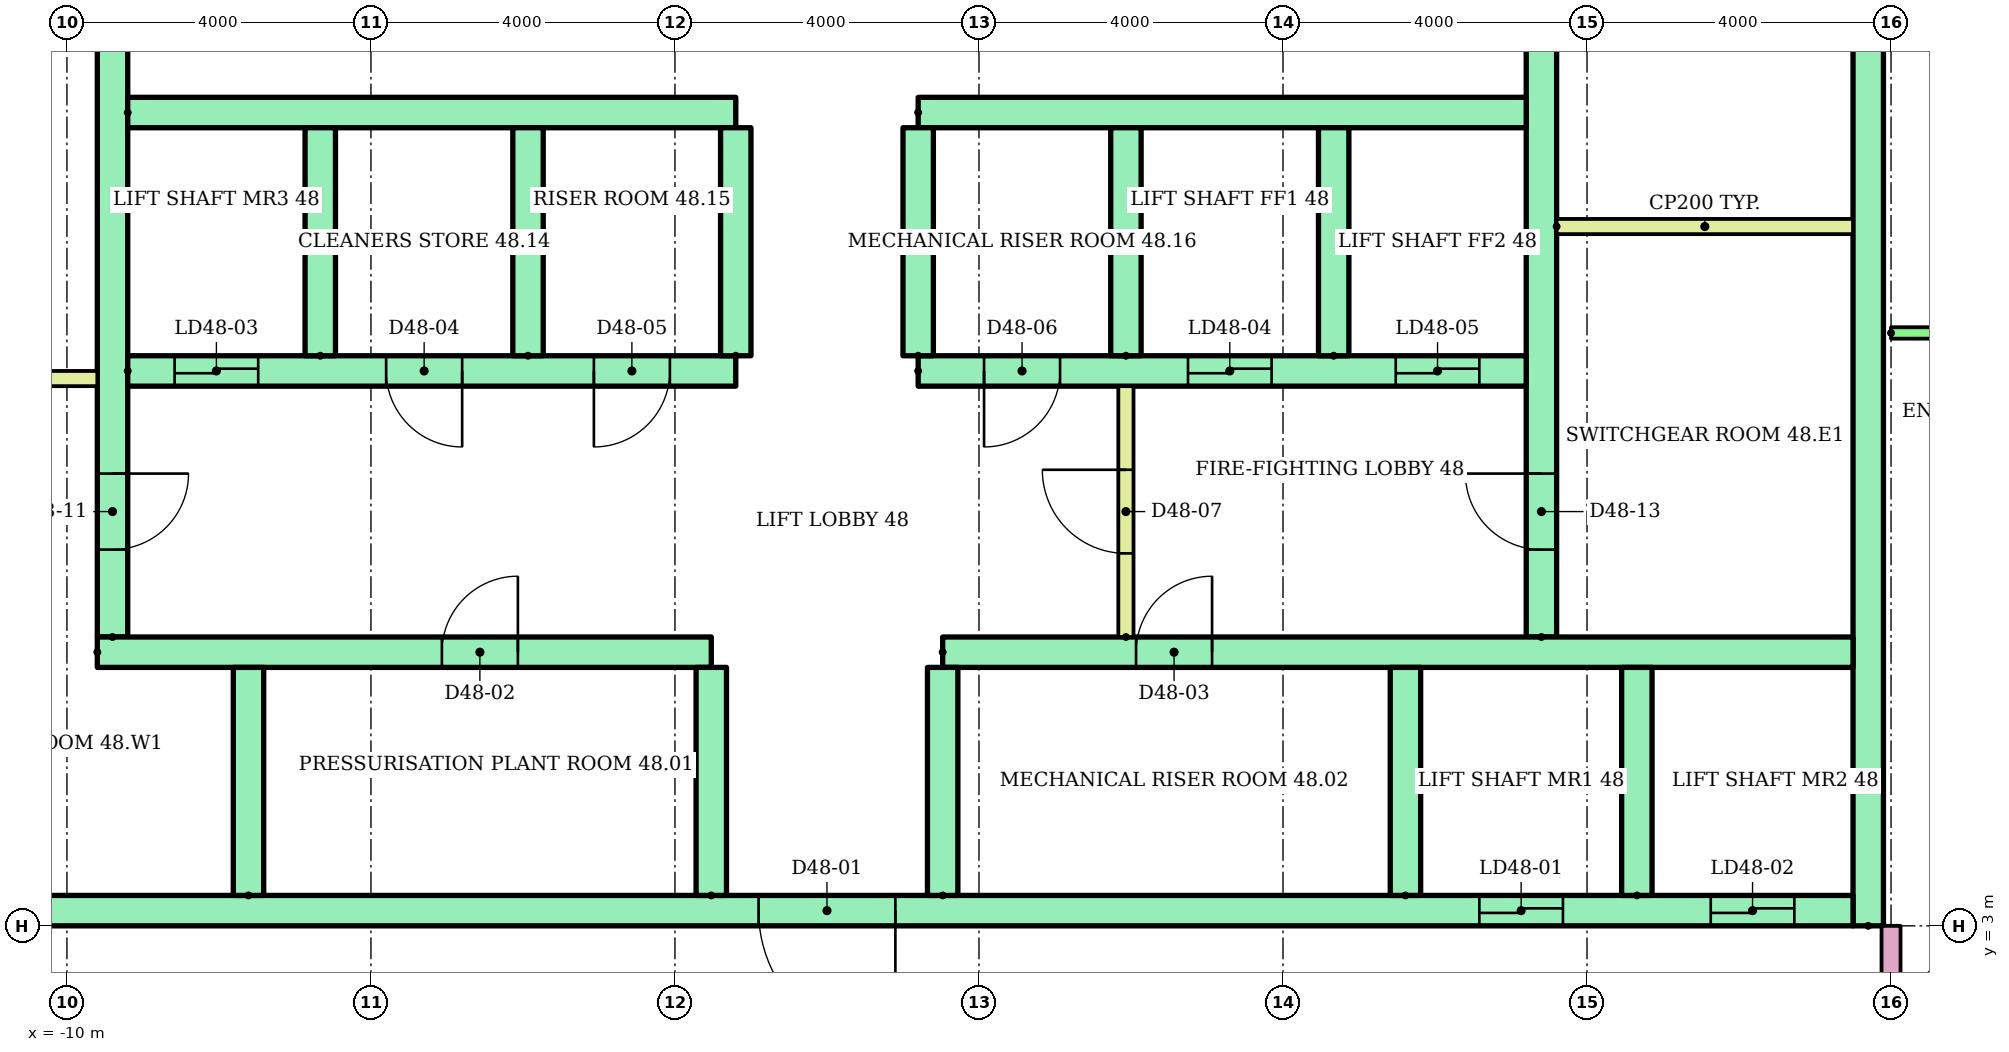
"""IFC4 building model, lengths in metres.
Left out: names, types, materials, properties, quantities, classifications, styles, units other than length and angle.
Written with IfcOpenShell. Run it as: python <this file> out.ifc"""

import sys

from ifc_helpers import new_model, si_unit, direction, frame, frame_2d, origin, place, context, subcontext, project, spatial, rectangle, extrude, element, fill, save


model = new_model("IFC4")
c1 = context("Model", 3, precision=1e-05, world=origin(), true_north=direction((0.0, 1.0)))
c2 = subcontext(c1, "Body", "Model", "MODEL_VIEW")
j1 = project(units=[si_unit("LENGTHUNIT", "METRE"), si_unit("PLANEANGLEUNIT", "RADIAN")], contexts=[c1])
p1 = place(None, origin())
s1 = spatial("IfcSite", under=j1, at=p1, CompositionType="ELEMENT")
p2 = place(p1, origin())
s2 = spatial("IfcBuilding", under=s1, at=p2, CompositionType="ELEMENT")
p3 = place(p2, frame((0.0, 0.0, 184.5)))
s3 = spatial("IfcBuildingStorey", under=s2, at=p3, CompositionType="ELEMENT", Elevation=184.5)
p4 = place(p3, frame((13.7, 3.0, 0.0), z_axis=(0.0, 0.0, 1.0), x_axis=(0.0, 1.0, 0.0)))
e1 = element("IfcWall", 1, at=p4, inside=s3, PredefinedType="SHEAR", context=c2, shape_type="SweptSolid", body=[
    extrude(rectangle(XDim=17.0, YDim=0.4, at=frame_2d((8.5, 0.0))), origin(), (0.0, 0.0, 1.0), 2.92),
])
p5 = place(p3, frame((-9.4, 6.8, 0.0), z_axis=(0.0, 0.0, 1.0), x_axis=(0.0, 1.0, 0.0)))
e2 = element("IfcWall", 2, at=p5, inside=s3, PredefinedType="SHEAR", context=c2, shape_type="SweptSolid", body=[
    extrude(rectangle(XDim=12.7, YDim=0.4, at=frame_2d((6.35, 0.0))), origin(), (0.0, 0.0, 1.0), 2.92),
])
p6 = place(p5, frame((1.15, 0.0, 0.0)))
e3 = element("IfcOpeningElement", 3, at=p6, cuts=e2, PredefinedType="OPENING", context=c2, shape_type="SweptSolid", body=[
    extrude(rectangle(XDim=1.0, YDim=2.1, at=frame_2d((0.5, 1.05))), frame((0.0, 0.21, 0.0), z_axis=(0.0, -1.0, 0.0), x_axis=(1.0, 0.0, 0.0)), (0.0, 0.0, 1.0), 0.42),
])
p7 = place(p5, frame((7.925, 0.0, 0.0)))
e4 = element("IfcOpeningElement", 4, at=p7, cuts=e2, PredefinedType="OPENING", context=c2, shape_type="SweptSolid", body=[
    extrude(rectangle(XDim=1.0, YDim=2.1, at=frame_2d((0.5, 1.05))), frame((0.0, 0.21, 0.0), z_axis=(0.0, -1.0, 0.0), x_axis=(1.0, 0.0, 0.0)), (0.0, 0.0, 1.0), 0.42),
])
p8 = place(p3, frame((9.4, 6.8, 0.0), z_axis=(0.0, 0.0, 1.0), x_axis=(0.0, 1.0, 0.0)))
e5 = element("IfcWall", 5, at=p8, inside=s3, PredefinedType="SHEAR", context=c2, shape_type="SweptSolid", body=[
    extrude(rectangle(XDim=12.7, YDim=0.4, at=frame_2d((6.35, 0.0))), origin(), (0.0, 0.0, 1.0), 2.92),
])
p9 = place(p8, frame((1.15, 0.0, 0.0)))
e6 = element("IfcOpeningElement", 6, at=p9, cuts=e5, PredefinedType="OPENING", context=c2, shape_type="SweptSolid", body=[
    extrude(rectangle(XDim=1.0, YDim=2.1, at=frame_2d((0.5, 1.05))), frame((0.0, 0.21, 0.0), z_axis=(0.0, -1.0, 0.0), x_axis=(1.0, 0.0, 0.0)), (0.0, 0.0, 1.0), 0.42),
])
p10 = place(p8, frame((7.925, 0.0, 0.0)))
e7 = element("IfcOpeningElement", 7, at=p10, cuts=e5, PredefinedType="OPENING", context=c2, shape_type="SweptSolid", body=[
    extrude(rectangle(XDim=1.0, YDim=2.1, at=frame_2d((0.5, 1.05))), frame((0.0, 0.21, 0.0), z_axis=(0.0, -1.0, 0.0), x_axis=(1.0, 0.0, 0.0)), (0.0, 0.0, 1.0), 0.42),
])
p11 = place(p3, frame((-13.5, 3.2, 0.0)))
e8 = element("IfcWall", 8, at=p11, inside=s3, PredefinedType="SHEAR", context=c2, shape_type="SweptSolid", body=[
    extrude(rectangle(XDim=27.0, YDim=0.4, at=frame_2d((13.5, 0.0))), origin(), (0.0, 0.0, 1.0), 2.92),
])
p12 = place(p11, frame((22.083, 0.0, 0.0)))
e9 = element("IfcOpeningElement", 9, at=p12, cuts=e8, PredefinedType="OPENING", context=c2, shape_type="SweptSolid", body=[
    extrude(rectangle(XDim=1.1, YDim=2.1, at=frame_2d((0.55, 1.05))), frame((0.0, 0.21, 0.0), z_axis=(0.0, -1.0, 0.0), x_axis=(1.0, 0.0, 0.0)), (0.0, 0.0, 1.0), 0.42),
])
p13 = place(p11, frame((25.128, 0.0, 0.0)))
e10 = element("IfcOpeningElement", 10, at=p13, cuts=e8, PredefinedType="OPENING", context=c2, shape_type="SweptSolid", body=[
    extrude(rectangle(XDim=1.1, YDim=2.1, at=frame_2d((0.55, 1.05))), frame((0.0, 0.21, 0.0), z_axis=(0.0, -1.0, 0.0), x_axis=(1.0, 0.0, 0.0)), (0.0, 0.0, 1.0), 0.42),
])
p14 = place(p11, frame((12.6, 0.0, 0.0)))
e11 = element("IfcOpeningElement", 11, at=p14, cuts=e8, PredefinedType="OPENING", context=c2, shape_type="SweptSolid", body=[
    extrude(rectangle(XDim=1.8, YDim=2.1, at=frame_2d((0.9, 1.05))), frame((0.0, 0.21, 0.0), z_axis=(0.0, -1.0, 0.0), x_axis=(1.0, 0.0, 0.0)), (0.0, 0.0, 1.0), 0.42),
])
p15 = place(p3, frame((-9.6, 6.6, 0.0)))
e12 = element("IfcWall", 12, at=p15, inside=s3, PredefinedType="SHEAR", context=c2, shape_type="SweptSolid", body=[
    extrude(rectangle(XDim=8.078, YDim=0.4, at=frame_2d((4.039, 0.0))), origin(), (0.0, 0.0, 1.0), 2.92),
])
p16 = place(p15, frame((4.533, 0.0, 0.0)))
e13 = element("IfcOpeningElement", 13, at=p16, cuts=e12, PredefinedType="OPENING", context=c2, shape_type="SweptSolid", body=[
    extrude(rectangle(XDim=1.0, YDim=2.1, at=frame_2d((0.5, 1.05))), frame((0.0, 0.21, 0.0), z_axis=(0.0, -1.0, 0.0), x_axis=(1.0, 0.0, 0.0)), (0.0, 0.0, 1.0), 0.42),
])
p17 = place(p3, frame((1.522, 6.6, 0.0)))
e14 = element("IfcWall", 14, at=p17, inside=s3, PredefinedType="SHEAR", context=c2, shape_type="SweptSolid", body=[
    extrude(rectangle(XDim=11.978, YDim=0.4, at=frame_2d((5.989, 0.0))), origin(), (0.0, 0.0, 1.0), 2.92),
])
p18 = place(p17, frame((2.544, 0.0, 0.0)))
e15 = element("IfcOpeningElement", 15, at=p18, cuts=e14, PredefinedType="OPENING", context=c2, shape_type="SweptSolid", body=[
    extrude(rectangle(XDim=1.0, YDim=2.1, at=frame_2d((0.5, 1.05))), frame((0.0, 0.21, 0.0), z_axis=(0.0, -1.0, 0.0), x_axis=(1.0, 0.0, 0.0)), (0.0, 0.0, 1.0), 0.42),
])
for number, where, z_axis, x_axis in (
    (16, (-7.611, 3.4, 0.0), (0.0, 0.0, 1.0), (0.0, 1.0, 0.0)),
    (17, (-1.522, 3.4, 0.0), (0.0, 0.0, 1.0), (0.0, 1.0, 0.0)),
    (18, (1.522, 3.4, 0.0), (0.0, 0.0, 1.0), (0.0, 1.0, 0.0)),
    (19, (7.611, 3.4, 0.0), (0.0, 0.0, 1.0), (0.0, 1.0, 0.0)),
    (20, (10.656, 3.4, 0.0), (0.0, 0.0, 1.0), (0.0, 1.0, 0.0)),
):
    element("IfcWall", number, at=place(p3, frame(where, z_axis=z_axis, x_axis=x_axis)), inside=s3, PredefinedType="SHEAR", context=c2, shape_type="SweptSolid", body=[
        extrude(rectangle(XDim=3.0, YDim=0.4, at=frame_2d((1.5, 0.0))), origin(), (0.0, 0.0, 1.0), 2.92),
    ])
p19 = place(p3, frame((-9.2, 10.3, 0.0)))
e21 = element("IfcWall", 21, at=p19, inside=s3, PredefinedType="SHEAR", context=c2, shape_type="SweptSolid", body=[
    extrude(rectangle(XDim=8.0, YDim=0.4, at=frame_2d((4.0, 0.0))), origin(), (0.0, 0.0, 1.0), 2.92),
])
p20 = place(p19, frame((0.617, 0.0, 0.0)))
e22 = element("IfcOpeningElement", 22, at=p20, cuts=e21, PredefinedType="OPENING", context=c2, shape_type="SweptSolid", body=[
    extrude(rectangle(XDim=1.1, YDim=2.1, at=frame_2d((0.55, 1.05))), frame((0.0, 0.21, 0.0), z_axis=(0.0, -1.0, 0.0), x_axis=(1.0, 0.0, 0.0)), (0.0, 0.0, 1.0), 0.42),
])
p21 = place(p19, frame((3.4, 0.0, 0.0)))
e23 = element("IfcOpeningElement", 23, at=p21, cuts=e21, PredefinedType="OPENING", context=c2, shape_type="SweptSolid", body=[
    extrude(rectangle(XDim=1.0, YDim=2.1, at=frame_2d((0.5, 1.05))), frame((0.0, 0.21, 0.0), z_axis=(0.0, -1.0, 0.0), x_axis=(1.0, 0.0, 0.0)), (0.0, 0.0, 1.0), 0.42),
])
p22 = place(p19, frame((6.133, 0.0, 0.0)))
e24 = element("IfcOpeningElement", 24, at=p22, cuts=e21, PredefinedType="OPENING", context=c2, shape_type="SweptSolid", body=[
    extrude(rectangle(XDim=1.0, YDim=2.1, at=frame_2d((0.5, 1.05))), frame((0.0, 0.21, 0.0), z_axis=(0.0, -1.0, 0.0), x_axis=(1.0, 0.0, 0.0)), (0.0, 0.0, 1.0), 0.42),
])
p23 = place(p3, frame((-9.2, 13.7, 0.0)))
e25 = element("IfcWall", 25, at=p23, inside=s3, PredefinedType="SHEAR", context=c2, shape_type="SweptSolid", body=[
    extrude(rectangle(XDim=8.0, YDim=0.4, at=frame_2d((4.0, 0.0))), origin(), (0.0, 0.0, 1.0), 2.92),
])
p24 = place(p3, frame((1.2, 10.3, 0.0)))
e26 = element("IfcWall", 26, at=p24, inside=s3, PredefinedType="SHEAR", context=c2, shape_type="SweptSolid", body=[
    extrude(rectangle(XDim=8.0, YDim=0.4, at=frame_2d((4.0, 0.0))), origin(), (0.0, 0.0, 1.0), 2.92),
])
p25 = place(p24, frame((3.55, 0.0, 0.0)))
e27 = element("IfcOpeningElement", 27, at=p25, cuts=e26, PredefinedType="OPENING", context=c2, shape_type="SweptSolid", body=[
    extrude(rectangle(XDim=1.1, YDim=2.1, at=frame_2d((0.55, 1.05))), frame((0.0, 0.21, 0.0), z_axis=(0.0, -1.0, 0.0), x_axis=(1.0, 0.0, 0.0)), (0.0, 0.0, 1.0), 0.42),
])
p26 = place(p24, frame((6.283, 0.0, 0.0)))
e28 = element("IfcOpeningElement", 28, at=p26, cuts=e26, PredefinedType="OPENING", context=c2, shape_type="SweptSolid", body=[
    extrude(rectangle(XDim=1.1, YDim=2.1, at=frame_2d((0.55, 1.05))), frame((0.0, 0.21, 0.0), z_axis=(0.0, -1.0, 0.0), x_axis=(1.0, 0.0, 0.0)), (0.0, 0.0, 1.0), 0.42),
])
p27 = place(p24, frame((0.867, 0.0, 0.0)))
e29 = element("IfcOpeningElement", 29, at=p27, cuts=e26, PredefinedType="OPENING", context=c2, shape_type="SweptSolid", body=[
    extrude(rectangle(XDim=1.0, YDim=2.1, at=frame_2d((0.5, 1.05))), frame((0.0, 0.21, 0.0), z_axis=(0.0, -1.0, 0.0), x_axis=(1.0, 0.0, 0.0)), (0.0, 0.0, 1.0), 0.42),
])
p28 = place(p3, frame((1.2, 13.7, 0.0)))
e30 = element("IfcWall", 30, at=p28, inside=s3, PredefinedType="SHEAR", context=c2, shape_type="SweptSolid", body=[
    extrude(rectangle(XDim=8.0, YDim=0.4, at=frame_2d((4.0, 0.0))), origin(), (0.0, 0.0, 1.0), 2.92),
])
for number, where, z_axis, x_axis in (
    (31, (-6.667, 10.5, 0.0), (0.0, 0.0, 1.0), (0.0, 1.0, 0.0)),
    (32, (-3.933, 10.5, 0.0), (0.0, 0.0, 1.0), (0.0, 1.0, 0.0)),
    (33, (-1.2, 10.5, 0.0), (0.0, 0.0, 1.0), (0.0, 1.0, 0.0)),
    (34, (1.2, 10.5, 0.0), (0.0, 0.0, 1.0), (0.0, 1.0, 0.0)),
    (35, (3.933, 10.5, 0.0), (0.0, 0.0, 1.0), (0.0, 1.0, 0.0)),
    (36, (6.667, 10.5, 0.0), (0.0, 0.0, 1.0), (0.0, 1.0, 0.0)),
):
    element("IfcWall", number, at=place(p3, frame(where, z_axis=z_axis, x_axis=x_axis)), inside=s3, PredefinedType="SHEAR", context=c2, shape_type="SweptSolid", body=[
        extrude(rectangle(XDim=3.0, YDim=0.4, at=frame_2d((1.5, 0.0))), origin(), (0.0, 0.0, 1.0), 2.92),
    ])
p29 = place(p3, frame((3.933, 6.8, 0.0), z_axis=(0.0, 0.0, 1.0), x_axis=(0.0, 1.0, 0.0)))
e37 = element("IfcWall", 37, at=p29, inside=s3, PredefinedType="PARTITIONING", context=c2, shape_type="SweptSolid", body=[
    extrude(rectangle(XDim=3.3, YDim=0.2, at=frame_2d((1.65, 0.0))), origin(), (0.0, 0.0, 1.0), 2.92),
])
p30 = place(p29, frame((1.1, 0.0, 0.0)))
e38 = element("IfcOpeningElement", 38, at=p30, cuts=e37, PredefinedType="OPENING", context=c2, shape_type="SweptSolid", body=[
    extrude(rectangle(XDim=1.1, YDim=2.1, at=frame_2d((0.55, 1.05))), frame((0.0, 0.11, 0.0), z_axis=(0.0, -1.0, 0.0), x_axis=(1.0, 0.0, 0.0)), (0.0, 0.0, 1.0), 0.22),
])
for number, where in (
    (39, (-13.5, 10.2, 0.0)),
    (40, (9.6, 12.2, 0.0)),
):
    element("IfcWall", number, at=place(p3, frame(where)), inside=s3, PredefinedType="PARTITIONING", context=c2, shape_type="SweptSolid", body=[
        extrude(rectangle(XDim=3.9, YDim=0.2, at=frame_2d((1.95, 0.0))), origin(), (0.0, 0.0, 1.0), 2.92),
    ])
p31 = place(p3, frame((14.0, 10.8, 0.0)))
e41 = element("IfcWall", 41, at=p31, inside=s3, PredefinedType="PARTITIONING", context=c2, shape_type="SweptSolid", body=[
    extrude(rectangle(XDim=12.0, YDim=0.15, at=frame_2d((6.0, 0.0))), origin(), (0.0, 0.0, 1.0), 2.4),
])
p32 = place(p31, frame((1.5, 0.0, 0.0)))
e42 = element("IfcOpeningElement", 42, at=p32, cuts=e41, PredefinedType="OPENING", context=c2, shape_type="SweptSolid", body=[
    extrude(rectangle(XDim=1.0, YDim=2.1, at=frame_2d((0.5, 1.05))), frame((0.0, 0.085, 0.0), z_axis=(0.0, -1.0, 0.0), x_axis=(1.0, 0.0, 0.0)), (0.0, 0.0, 1.0), 0.17),
])
p33 = place(p31, frame((7.55, 0.0, 0.0)))
e43 = element("IfcOpeningElement", 43, at=p33, cuts=e41, PredefinedType="OPENING", context=c2, shape_type="SweptSolid", body=[
    extrude(rectangle(XDim=0.9, YDim=2.1, at=frame_2d((0.45, 1.05))), frame((0.0, 0.085, 0.0), z_axis=(0.0, -1.0, 0.0), x_axis=(1.0, 0.0, 0.0)), (0.0, 0.0, 1.0), 0.17),
])
p34 = place(p3, frame((14.0, 1.4, 0.0), z_axis=(0.0, 0.0, 1.0), x_axis=(0.0, 1.0, 0.0)))
e44 = element("IfcWall", 44, at=p34, inside=s3, PredefinedType="PARTITIONING", context=c2, shape_type="SweptSolid", body=[
    extrude(rectangle(XDim=1.6, YDim=0.25, at=frame_2d((0.8, 0.0))), origin(), (0.0, 0.0, 1.0), 2.4),
])
p35 = place(p12, origin())
e45 = element("IfcDoor", 45, at=p35, inside=s3, OperationType="SLIDING_TO_LEFT", PredefinedType="DOOR", context=c2, shape_type="SweptSolid", body=[
    extrude(rectangle(XDim=1.1, YDim=2.1, at=frame_2d((0.55, 1.05))), frame((0.0, 0.025, 0.0), z_axis=(0.0, -1.0, 0.0), x_axis=(1.0, 0.0, 0.0)), (0.0, 0.0, 1.0), 0.05),
])
fill(e9, e45)
p36 = place(p13, origin())
e46 = element("IfcDoor", 46, at=p36, inside=s3, OperationType="SLIDING_TO_LEFT", PredefinedType="DOOR", context=c2, shape_type="SweptSolid", body=[
    extrude(rectangle(XDim=1.1, YDim=2.1, at=frame_2d((0.55, 1.05))), frame((0.0, 0.025, 0.0), z_axis=(0.0, -1.0, 0.0), x_axis=(1.0, 0.0, 0.0)), (0.0, 0.0, 1.0), 0.05),
])
fill(e10, e46)
p37 = place(p14, frame((1.8, 0.0, 0.0), z_axis=(0.0, 0.0, 1.0), x_axis=(-1.0, 0.0, 0.0)))
e47 = element("IfcDoor", 47, at=p37, inside=s3, OperationType="DOUBLE_DOOR_SINGLE_SWING", PredefinedType="DOOR", context=c2, shape_type="SweptSolid", body=[
    extrude(rectangle(XDim=1.8, YDim=2.1, at=frame_2d((0.9, 1.05))), frame((0.0, 0.025, 0.0), z_axis=(0.0, -1.0, 0.0), x_axis=(1.0, 0.0, 0.0)), (0.0, 0.0, 1.0), 0.05),
])
fill(e11, e47)
p38 = place(p16, origin())
e48 = element("IfcDoor", 48, at=p38, inside=s3, OperationType="SINGLE_SWING_RIGHT", PredefinedType="DOOR", context=c2, shape_type="SweptSolid", body=[
    extrude(rectangle(XDim=1.0, YDim=2.1, at=frame_2d((0.5, 1.05))), frame((0.0, 0.025, 0.0), z_axis=(0.0, -1.0, 0.0), x_axis=(1.0, 0.0, 0.0)), (0.0, 0.0, 1.0), 0.05),
])
fill(e13, e48)
p39 = place(p18, origin())
e49 = element("IfcDoor", 49, at=p39, inside=s3, OperationType="SINGLE_SWING_RIGHT", PredefinedType="DOOR", context=c2, shape_type="SweptSolid", body=[
    extrude(rectangle(XDim=1.0, YDim=2.1, at=frame_2d((0.5, 1.05))), frame((0.0, 0.025, 0.0), z_axis=(0.0, -1.0, 0.0), x_axis=(1.0, 0.0, 0.0)), (0.0, 0.0, 1.0), 0.05),
])
fill(e15, e49)
p40 = place(p20, origin())
e50 = element("IfcDoor", 50, at=p40, inside=s3, OperationType="SLIDING_TO_LEFT", PredefinedType="DOOR", context=c2, shape_type="SweptSolid", body=[
    extrude(rectangle(XDim=1.1, YDim=2.1, at=frame_2d((0.55, 1.05))), frame((0.0, 0.025, 0.0), z_axis=(0.0, -1.0, 0.0), x_axis=(1.0, 0.0, 0.0)), (0.0, 0.0, 1.0), 0.05),
])
fill(e22, e50)
p41 = place(p25, origin())
e51 = element("IfcDoor", 51, at=p41, inside=s3, OperationType="SLIDING_TO_LEFT", PredefinedType="DOOR", context=c2, shape_type="SweptSolid", body=[
    extrude(rectangle(XDim=1.1, YDim=2.1, at=frame_2d((0.55, 1.05))), frame((0.0, 0.025, 0.0), z_axis=(0.0, -1.0, 0.0), x_axis=(1.0, 0.0, 0.0)), (0.0, 0.0, 1.0), 0.05),
])
fill(e27, e51)
p42 = place(p26, origin())
e52 = element("IfcDoor", 52, at=p42, inside=s3, OperationType="SLIDING_TO_LEFT", PredefinedType="DOOR", context=c2, shape_type="SweptSolid", body=[
    extrude(rectangle(XDim=1.1, YDim=2.1, at=frame_2d((0.55, 1.05))), frame((0.0, 0.025, 0.0), z_axis=(0.0, -1.0, 0.0), x_axis=(1.0, 0.0, 0.0)), (0.0, 0.0, 1.0), 0.05),
])
fill(e28, e52)
p43 = place(p21, frame((1.0, 0.0, 0.0), z_axis=(0.0, 0.0, 1.0), x_axis=(-1.0, 0.0, 0.0)))
e53 = element("IfcDoor", 53, at=p43, inside=s3, OperationType="SINGLE_SWING_RIGHT", PredefinedType="DOOR", context=c2, shape_type="SweptSolid", body=[
    extrude(rectangle(XDim=1.0, YDim=2.1, at=frame_2d((0.5, 1.05))), frame((0.0, 0.025, 0.0), z_axis=(0.0, -1.0, 0.0), x_axis=(1.0, 0.0, 0.0)), (0.0, 0.0, 1.0), 0.05),
])
fill(e23, e53)
p44 = place(p22, frame((1.0, 0.0, 0.0), z_axis=(0.0, 0.0, 1.0), x_axis=(-1.0, 0.0, 0.0)))
e54 = element("IfcDoor", 54, at=p44, inside=s3, OperationType="SINGLE_SWING_LEFT", PredefinedType="DOOR", context=c2, shape_type="SweptSolid", body=[
    extrude(rectangle(XDim=1.0, YDim=2.1, at=frame_2d((0.5, 1.05))), frame((0.0, 0.025, 0.0), z_axis=(0.0, -1.0, 0.0), x_axis=(1.0, 0.0, 0.0)), (0.0, 0.0, 1.0), 0.05),
])
fill(e24, e54)
p45 = place(p27, frame((1.0, 0.0, 0.0), z_axis=(0.0, 0.0, 1.0), x_axis=(-1.0, 0.0, 0.0)))
e55 = element("IfcDoor", 55, at=p45, inside=s3, OperationType="SINGLE_SWING_LEFT", PredefinedType="DOOR", context=c2, shape_type="SweptSolid", body=[
    extrude(rectangle(XDim=1.0, YDim=2.1, at=frame_2d((0.5, 1.05))), frame((0.0, 0.025, 0.0), z_axis=(0.0, -1.0, 0.0), x_axis=(1.0, 0.0, 0.0)), (0.0, 0.0, 1.0), 0.05),
])
fill(e29, e55)
p46 = place(p30, origin())
e56 = element("IfcDoor", 56, at=p46, inside=s3, OperationType="SINGLE_SWING_RIGHT", PredefinedType="DOOR", context=c2, shape_type="SweptSolid", body=[
    extrude(rectangle(XDim=1.1, YDim=2.1, at=frame_2d((0.55, 1.05))), frame((0.0, 0.025, 0.0), z_axis=(0.0, -1.0, 0.0), x_axis=(1.0, 0.0, 0.0)), (0.0, 0.0, 1.0), 0.05),
])
fill(e38, e56)
p47 = place(p6, frame((1.0, 0.0, 0.0), z_axis=(0.0, 0.0, 1.0), x_axis=(-1.0, 0.0, 0.0)))
e57 = element("IfcDoor", 57, at=p47, inside=s3, OperationType="SINGLE_SWING_RIGHT", PredefinedType="DOOR", context=c2, shape_type="SweptSolid", body=[
    extrude(rectangle(XDim=1.0, YDim=2.1, at=frame_2d((0.5, 1.05))), frame((0.0, 0.025, 0.0), z_axis=(0.0, -1.0, 0.0), x_axis=(1.0, 0.0, 0.0)), (0.0, 0.0, 1.0), 0.05),
])
fill(e3, e57)
p48 = place(p9, origin())
e58 = element("IfcDoor", 58, at=p48, inside=s3, OperationType="SINGLE_SWING_RIGHT", PredefinedType="DOOR", context=c2, shape_type="SweptSolid", body=[
    extrude(rectangle(XDim=1.0, YDim=2.1, at=frame_2d((0.5, 1.05))), frame((0.0, 0.025, 0.0), z_axis=(0.0, -1.0, 0.0), x_axis=(1.0, 0.0, 0.0)), (0.0, 0.0, 1.0), 0.05),
])
fill(e6, e58)
save(model, sys.argv[1])
